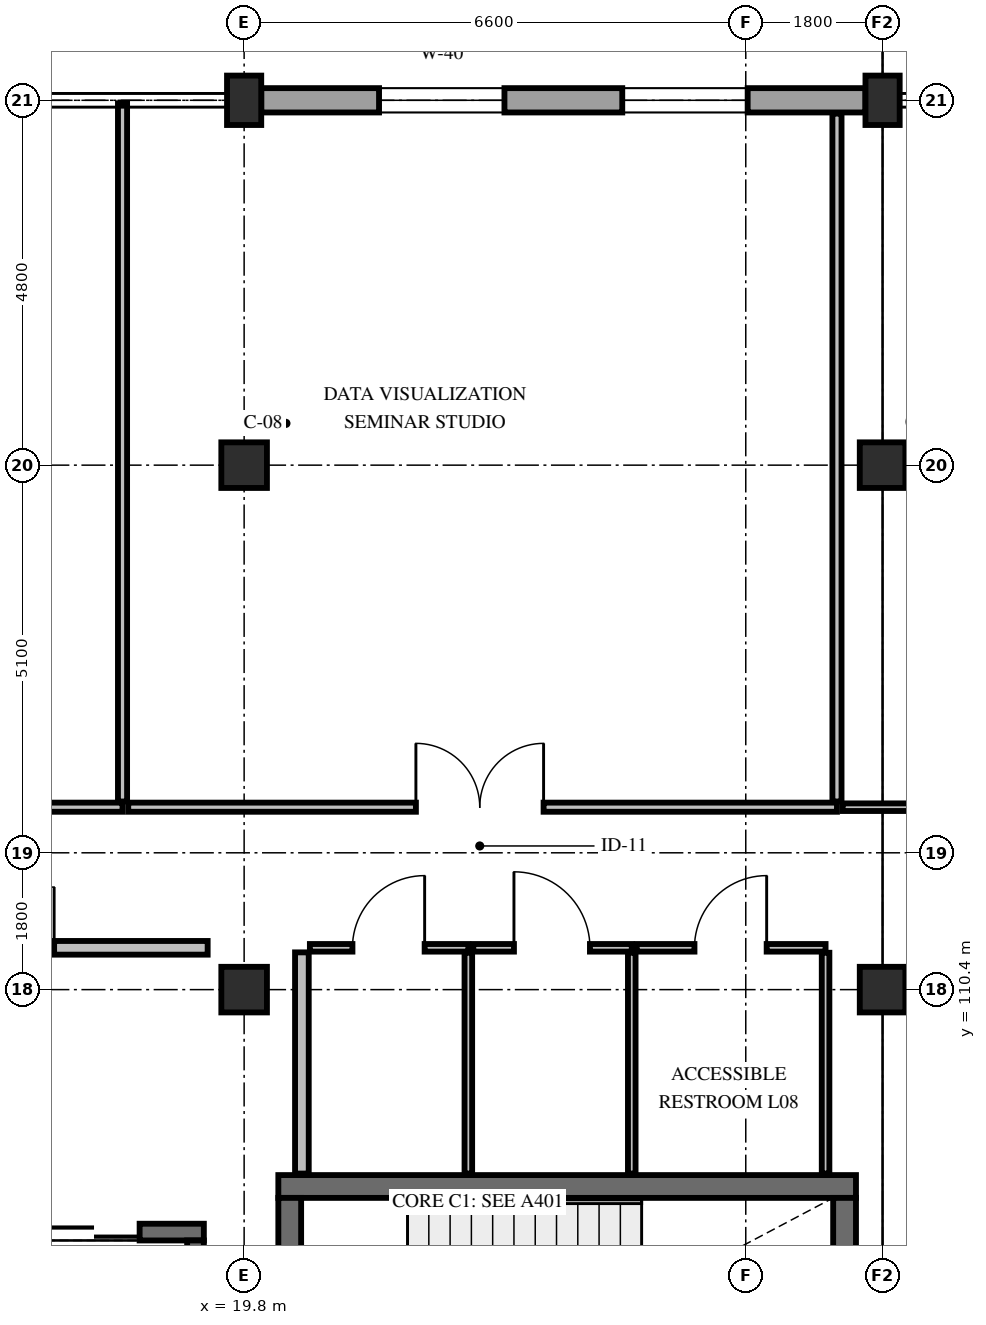
"""IFC4 building model, lengths in metres.
Left out: names, types, materials, properties, quantities, classifications, styles, units other than length and angle.
Written with IfcOpenShell. Run it as: python <this file> out.ifc"""

import sys

from ifc_helpers import new_model, si_unit, direction, frame, frame_2d, origin, origin_2d, place, context, subcontext, project, spatial, rectangle, extrude, element, fill, save


model = new_model("IFC4")
c1 = context("Model", 3, precision=1e-05, world=origin(), true_north=direction((0.0, 1.0)))
c2 = subcontext(c1, "Body", "Model", "MODEL_VIEW")
j1 = project(units=[si_unit("LENGTHUNIT", "METRE"), si_unit("PLANEANGLEUNIT", "RADIAN")], contexts=[c1])
p1 = place(None, origin())
s1 = spatial("IfcSite", under=j1, at=p1, CompositionType="ELEMENT")
p2 = place(p1, origin())
s2 = spatial("IfcBuilding", under=s1, at=p2, CompositionType="ELEMENT")
p3 = place(p2, frame((0.0, 0.0, 38.4)))
s3 = spatial("IfcBuildingStorey", under=s2, at=p3, CompositionType="ELEMENT", Elevation=38.4)
for number, where, z_axis, x_axis in (
    (1, (19.8, 110.4, 0.0), (0.0, 0.0, 1.0), (1.0, 0.0, 0.0)),
    (2, (19.8, 117.3, 0.0), (0.0, 0.0, 1.0), (1.0, 0.0, 0.0)),
):
    element("IfcColumn", number, at=place(p3, frame(where, z_axis=z_axis, x_axis=x_axis)), inside=s3, PredefinedType="COLUMN", context=c2, shape_type="SweptSolid", body=[
        extrude(rectangle(XDim=0.6, YDim=0.6, at=origin_2d()), origin(), (0.0, 0.0, 1.0), 4.2),
    ])
p4 = place(p3, frame((19.8, 122.1, 0.0), z_axis=(0.0, 0.0, 1.0), x_axis=(1.0, 0.0, 0.0)))
e3 = element("IfcColumn", 3, at=p4, inside=s3, PredefinedType="PILASTER", context=c2, shape_type="SweptSolid", body=[
    extrude(rectangle(XDim=0.45, YDim=0.65, at=origin_2d()), origin(), (0.0, 0.0, 1.0), 4.2),
])
for number, where, z_axis, x_axis in (
    (4, (28.2, 110.4, 0.0), (0.0, 0.0, 1.0), (1.0, 0.0, 0.0)),
    (5, (28.2, 117.3, 0.0), (0.0, 0.0, 1.0), (1.0, 0.0, 0.0)),
):
    element("IfcColumn", number, at=place(p3, frame(where, z_axis=z_axis, x_axis=x_axis)), inside=s3, PredefinedType="COLUMN", context=c2, shape_type="SweptSolid", body=[
        extrude(rectangle(XDim=0.6, YDim=0.6, at=origin_2d()), origin(), (0.0, 0.0, 1.0), 4.2),
    ])
p5 = place(p3, frame((28.2, 122.1, 0.0), z_axis=(0.0, 0.0, 1.0), x_axis=(1.0, 0.0, 0.0)))
e6 = element("IfcColumn", 6, at=p5, inside=s3, PredefinedType="PILASTER", context=c2, shape_type="SweptSolid", body=[
    extrude(rectangle(XDim=0.45, YDim=0.65, at=origin_2d()), origin(), (0.0, 0.0, 1.0), 4.2),
])
p6 = place(p3, frame((20.025, 122.1, 0.0), z_axis=(0.0, 0.0, 1.0), x_axis=(1.0, 0.0, 0.0)))
e7 = element("IfcWall", 7, at=p6, inside=s3, PredefinedType="STANDARD", context=c2, shape_type="SweptSolid", body=[
    extrude(rectangle(XDim=7.95, YDim=0.32, at=frame_2d((3.975, 0.0))), origin(), (0.0, 0.0, 1.0), 3.33),
])
p7 = place(p6, frame((1.55, 0.0, 0.85)))
e8 = element("IfcOpeningElement", 8, at=p7, cuts=e7, PredefinedType="OPENING", context=c2, shape_type="SweptSolid", body=[
    extrude(rectangle(XDim=1.65, YDim=2.08, at=frame_2d((0.825, 1.04))), frame((0.0, 0.175, 0.0), z_axis=(0.0, -1.0, 0.0), x_axis=(1.0, 0.0, 0.0)), (0.0, 0.0, 1.0), 0.35),
])
p8 = place(p6, frame((4.75, 0.0, 0.85)))
e9 = element("IfcOpeningElement", 9, at=p8, cuts=e7, PredefinedType="OPENING", context=c2, shape_type="SweptSolid", body=[
    extrude(rectangle(XDim=1.65, YDim=2.08, at=frame_2d((0.825, 1.04))), frame((0.0, 0.175, 0.0), z_axis=(0.0, -1.0, 0.0), x_axis=(1.0, 0.0, 0.0)), (0.0, 0.0, 1.0), 0.35),
])
p9 = place(p3, frame((20.25, 107.81, 0.0), z_axis=(0.0, 0.0, 1.0), x_axis=(1.0, 0.0, 0.0)))
e10 = element("IfcWall", 10, at=p9, inside=s3, PredefinedType="SHEAR", context=c2, shape_type="SweptSolid", body=[
    extrude(rectangle(XDim=7.6, YDim=0.3, at=frame_2d((3.8, 0.0))), origin(), (0.0, 0.0, 1.0), 3.9),
])
p10 = place(p3, frame((20.4, 104.7, 0.0), z_axis=(0.0, 0.0, 1.0), x_axis=(0.0, 1.0, 0.0)))
e11 = element("IfcWall", 11, at=p10, inside=s3, PredefinedType="SHEAR", context=c2, shape_type="SweptSolid", body=[
    extrude(rectangle(XDim=2.96, YDim=0.3, at=frame_2d((1.48, 0.0))), origin(), (0.0, 0.0, 1.0), 3.9),
])
p11 = place(p10, frame((0.92, 0.0, 0.0)))
e12 = element("IfcOpeningElement", 12, at=p11, cuts=e11, PredefinedType="OPENING", context=c2, shape_type="SweptSolid", body=[
    extrude(rectangle(XDim=1.12, YDim=2.2, at=frame_2d((0.56, 1.1))), frame((0.0, 0.165, 0.0), z_axis=(0.0, -1.0, 0.0), x_axis=(1.0, 0.0, 0.0)), (0.0, 0.0, 1.0), 0.33),
])
p12 = place(p3, frame((27.7, 104.7, 0.0), z_axis=(0.0, 0.0, 1.0), x_axis=(0.0, 1.0, 0.0)))
e13 = element("IfcWall", 13, at=p12, inside=s3, PredefinedType="SHEAR", context=c2, shape_type="SweptSolid", body=[
    extrude(rectangle(XDim=2.96, YDim=0.3, at=frame_2d((1.48, 0.0))), origin(), (0.0, 0.0, 1.0), 3.9),
])
p13 = place(p3, frame((16.38, 107.21, 0.0), z_axis=(0.0, 0.0, 1.0), x_axis=(1.0, 0.0, 0.0)))
e14 = element("IfcWall", 14, at=p13, inside=s3, PredefinedType="SHEAR", context=c2, shape_type="SweptSolid", body=[
    extrude(rectangle(XDim=2.89, YDim=0.22, at=frame_2d((1.445, 0.0))), origin(), (0.0, 0.0, 1.0), 3.9),
])
p14 = place(p13, frame((0.845, 0.0, 0.0)))
e15 = element("IfcOpeningElement", 15, at=p14, cuts=e14, PredefinedType="OPENING", context=c2, shape_type="SweptSolid", body=[
    extrude(rectangle(XDim=1.2, YDim=2.2, at=frame_2d((0.6, 1.1))), frame((0.0, 0.125, 0.0), z_axis=(0.0, -1.0, 0.0), x_axis=(1.0, 0.0, 0.0)), (0.0, 0.0, 1.0), 0.25),
])
p15 = place(p3, frame((19.16, 104.7, 0.0), z_axis=(0.0, 0.0, 1.0), x_axis=(0.0, 1.0, 0.0)))
e16 = element("IfcWall", 16, at=p15, inside=s3, PredefinedType="SHEAR", context=c2, shape_type="SweptSolid", body=[
    extrude(rectangle(XDim=2.4, YDim=0.22, at=frame_2d((1.2, 0.0))), origin(), (0.0, 0.0, 1.0), 3.9),
])
p16 = place(p3, frame((13.85, 110.95, 0.0), z_axis=(0.0, 0.0, 1.0), x_axis=(1.0, 0.0, 0.0)))
e17 = element("IfcWall", 17, at=p16, inside=s3, PredefinedType="PARTITIONING", context=c2, shape_type="SweptSolid", body=[
    extrude(rectangle(XDim=5.47, YDim=0.18, at=frame_2d((2.735, 0.0))), origin(), (0.0, 0.0, 1.0), 3.745),
])
p17 = place(p16, frame((1.85, 0.0, 0.0)))
e18 = element("IfcOpeningElement", 18, at=p17, cuts=e17, PredefinedType="OPENING", context=c2, shape_type="SweptSolid", body=[
    extrude(rectangle(XDim=1.6, YDim=2.25, at=frame_2d((0.8, 1.125))), frame((0.0, 0.105, 0.0), z_axis=(0.0, -1.0, 0.0), x_axis=(1.0, 0.0, 0.0)), (0.0, 0.0, 1.0), 0.21),
])
p18 = place(p3, frame((20.56, 107.98, 0.0), z_axis=(0.0, 0.0, 1.0), x_axis=(0.0, 1.0, 0.0)))
e19 = element("IfcWall", 19, at=p18, inside=s3, PredefinedType="PARTITIONING", context=c2, shape_type="SweptSolid", body=[
    extrude(rectangle(XDim=2.91, YDim=0.18, at=frame_2d((1.455, 0.0))), origin(), (0.0, 0.0, 1.0), 3.23),
])
p19 = place(p3, frame((20.665, 110.95, 0.0), z_axis=(0.0, 0.0, 1.0), x_axis=(1.0, 0.0, 0.0)))
e20 = element("IfcWall", 20, at=p19, inside=s3, PredefinedType="PARTITIONING", context=c2, shape_type="SweptSolid", body=[
    extrude(rectangle(XDim=2.085, YDim=0.1, at=frame_2d((1.042, 0.0))), origin(), (0.0, 0.0, 1.0), 3.745),
])
p20 = place(p19, frame((0.56, 0.0, 0.0)))
e21 = element("IfcOpeningElement", 21, at=p20, cuts=e20, PredefinedType="OPENING", context=c2, shape_type="SweptSolid", body=[
    extrude(rectangle(XDim=0.95, YDim=2.15, at=frame_2d((0.475, 1.075))), frame((0.0, 0.065, 0.0), z_axis=(0.0, -1.0, 0.0), x_axis=(1.0, 0.0, 0.0)), (0.0, 0.0, 1.0), 0.13),
])
p21 = place(p3, frame((22.75, 107.98, 0.0), z_axis=(0.0, 0.0, 1.0), x_axis=(0.0, 1.0, 0.0)))
e22 = element("IfcWall", 22, at=p21, inside=s3, PredefinedType="PARTITIONING", context=c2, shape_type="SweptSolid", body=[
    extrude(rectangle(XDim=2.905, YDim=0.1, at=frame_2d((1.453, 0.0))), origin(), (0.0, 0.0, 1.0), 3.23),
])
p22 = place(p3, frame((22.815, 110.95, 0.0), z_axis=(0.0, 0.0, 1.0), x_axis=(1.0, 0.0, 0.0)))
e23 = element("IfcWall", 23, at=p22, inside=s3, PredefinedType="PARTITIONING", context=c2, shape_type="SweptSolid", body=[
    extrude(rectangle(XDim=2.085, YDim=0.1, at=frame_2d((1.042, 0.0))), origin(), (0.0, 0.0, 1.0), 3.88),
])
p23 = place(p22, frame((0.535, 0.0, 0.0)))
e24 = element("IfcOpeningElement", 24, at=p23, cuts=e23, PredefinedType="OPENING", context=c2, shape_type="SweptSolid", body=[
    extrude(rectangle(XDim=1.0, YDim=2.15, at=frame_2d((0.5, 1.075))), frame((0.0, 0.065, 0.0), z_axis=(0.0, -1.0, 0.0), x_axis=(1.0, 0.0, 0.0)), (0.0, 0.0, 1.0), 0.13),
])
p24 = place(p3, frame((24.9, 107.98, 0.0), z_axis=(0.0, 0.0, 1.0), x_axis=(0.0, 1.0, 0.0)))
e25 = element("IfcWall", 25, at=p24, inside=s3, PredefinedType="PARTITIONING", context=c2, shape_type="SweptSolid", body=[
    extrude(rectangle(XDim=2.905, YDim=0.1, at=frame_2d((1.453, 0.0))), origin(), (0.0, 0.0, 1.0), 3.23),
])
p25 = place(p3, frame((24.965, 110.95, 0.0), z_axis=(0.0, 0.0, 1.0), x_axis=(1.0, 0.0, 0.0)))
e26 = element("IfcWall", 26, at=p25, inside=s3, PredefinedType="PARTITIONING", context=c2, shape_type="SweptSolid", body=[
    extrude(rectangle(XDim=2.485, YDim=0.1, at=frame_2d((1.242, 0.0))), origin(), (0.0, 0.0, 1.0), 3.745),
])
p26 = place(p25, frame((0.76, 0.0, 0.0)))
e27 = element("IfcOpeningElement", 27, at=p26, cuts=e26, PredefinedType="OPENING", context=c2, shape_type="SweptSolid", body=[
    extrude(rectangle(XDim=0.95, YDim=2.15, at=frame_2d((0.475, 1.075))), frame((0.0, 0.065, 0.0), z_axis=(0.0, -1.0, 0.0), x_axis=(1.0, 0.0, 0.0)), (0.0, 0.0, 1.0), 0.13),
])
p27 = place(p3, frame((27.45, 107.98, 0.0), z_axis=(0.0, 0.0, 1.0), x_axis=(0.0, 1.0, 0.0)))
e28 = element("IfcWall", 28, at=p27, inside=s3, PredefinedType="PARTITIONING", context=c2, shape_type="SweptSolid", body=[
    extrude(rectangle(XDim=2.905, YDim=0.1, at=frame_2d((1.453, 0.0))), origin(), (0.0, 0.0, 1.0), 3.23),
])
p28 = place(p3, frame((9.275, 112.8, 0.0), z_axis=(0.0, 0.0, 1.0), x_axis=(1.0, 0.0, 0.0)))
e29 = element("IfcWall", 29, at=p28, inside=s3, PredefinedType="PARTITIONING", context=c2, shape_type="SweptSolid", body=[
    extrude(rectangle(XDim=8.925, YDim=0.12, at=frame_2d((4.462, 0.0))), origin(), (0.0, 0.0, 1.0), 3.53),
])
p29 = place(p28, frame((4.785, 0.0, 0.0)))
e30 = element("IfcOpeningElement", 30, at=p29, cuts=e29, PredefinedType="OPENING", context=c2, shape_type="SweptSolid", body=[
    extrude(rectangle(XDim=1.38, YDim=2.25, at=frame_2d((0.69, 1.125))), frame((0.0, 0.075, 0.0), z_axis=(0.0, -1.0, 0.0), x_axis=(1.0, 0.0, 0.0)), (0.0, 0.0, 1.0), 0.15),
])
p30 = place(p3, frame((18.2, 112.875, 0.0), z_axis=(0.0, 0.0, 1.0), x_axis=(0.0, 1.0, 0.0)))
e31 = element("IfcWall", 31, at=p30, inside=s3, PredefinedType="PARTITIONING", context=c2, shape_type="SweptSolid", body=[
    extrude(rectangle(XDim=9.185, YDim=0.12, at=frame_2d((4.593, 0.0))), origin(), (0.0, 0.0, 1.0), 3.33),
])
p31 = place(p3, frame((18.275, 112.8, 0.0), z_axis=(0.0, 0.0, 1.0), x_axis=(1.0, 0.0, 0.0)))
e32 = element("IfcWall", 32, at=p31, inside=s3, PredefinedType="PARTITIONING", context=c2, shape_type="SweptSolid", body=[
    extrude(rectangle(XDim=9.325, YDim=0.12, at=frame_2d((4.663, 0.0))), origin(), (0.0, 0.0, 1.0), 3.53),
])
p32 = place(p31, frame((3.785, 0.0, 0.0)))
e33 = element("IfcOpeningElement", 33, at=p32, cuts=e32, PredefinedType="OPENING", context=c2, shape_type="SweptSolid", body=[
    extrude(rectangle(XDim=1.68, YDim=2.3, at=frame_2d((0.84, 1.15))), frame((0.0, 0.075, 0.0), z_axis=(0.0, -1.0, 0.0), x_axis=(1.0, 0.0, 0.0)), (0.0, 0.0, 1.0), 0.15),
])
p33 = place(p3, frame((27.6, 112.875, 0.0), z_axis=(0.0, 0.0, 1.0), x_axis=(0.0, 1.0, 0.0)))
e34 = element("IfcWall", 34, at=p33, inside=s3, PredefinedType="PARTITIONING", context=c2, shape_type="SweptSolid", body=[
    extrude(rectangle(XDim=9.05, YDim=0.12, at=frame_2d((4.525, 0.0))), origin(), (0.0, 0.0, 1.0), 3.23),
])
p34 = place(p3, frame((27.675, 112.8, 0.0), z_axis=(0.0, 0.0, 1.0), x_axis=(1.0, 0.0, 0.0)))
e35 = element("IfcWall", 35, at=p34, inside=s3, PredefinedType="PARTITIONING", context=c2, shape_type="SweptSolid", body=[
    extrude(rectangle(XDim=9.525, YDim=0.1, at=frame_2d((4.762, 0.0))), origin(), (0.0, 0.0, 1.0), 3.53),
])
p35 = place(p34, frame((6.365, 0.0, 0.0)))
e36 = element("IfcOpeningElement", 36, at=p35, cuts=e35, PredefinedType="OPENING", context=c2, shape_type="SweptSolid", body=[
    extrude(rectangle(XDim=1.02, YDim=2.2, at=frame_2d((0.51, 1.1))), frame((0.0, 0.065, 0.0), z_axis=(0.0, -1.0, 0.0), x_axis=(1.0, 0.0, 0.0)), (0.0, 0.0, 1.0), 0.13),
])
p36 = place(p7, origin())
e37 = element("IfcWindow", 37, at=p36, inside=s3, PartitioningType="SINGLE_PANEL", PredefinedType="WINDOW", context=c2, shape_type="SweptSolid", body=[
    extrude(rectangle(XDim=1.65, YDim=2.08, at=frame_2d((0.825, 1.04))), frame((0.0, 0.03, 0.0), z_axis=(0.0, -1.0, 0.0), x_axis=(1.0, 0.0, 0.0)), (0.0, 0.0, 1.0), 0.06),
])
fill(e8, e37)
p37 = place(p8, origin())
e38 = element("IfcWindow", 38, at=p37, inside=s3, PartitioningType="SINGLE_PANEL", PredefinedType="WINDOW", context=c2, shape_type="SweptSolid", body=[
    extrude(rectangle(XDim=1.65, YDim=2.08, at=frame_2d((0.825, 1.04))), frame((0.0, 0.03, 0.0), z_axis=(0.0, -1.0, 0.0), x_axis=(1.0, 0.0, 0.0)), (0.0, 0.0, 1.0), 0.06),
])
fill(e9, e38)
p38 = place(p14, origin())
e39 = element("IfcDoor", 39, at=p38, inside=s3, OperationType="DOUBLE_DOOR_SLIDING", PredefinedType="DOOR", context=c2, shape_type="SweptSolid", body=[
    extrude(rectangle(XDim=1.2, YDim=2.2, at=frame_2d((0.6, 1.1))), frame((0.0, 0.025, 0.0), z_axis=(0.0, -1.0, 0.0), x_axis=(1.0, 0.0, 0.0)), (0.0, 0.0, 1.0), 0.05),
])
fill(e15, e39)
p39 = place(p17, origin())
e40 = element("IfcDoor", 40, at=p39, inside=s3, OperationType="DOUBLE_DOOR_SINGLE_SWING", PredefinedType="DOOR", context=c2, shape_type="SweptSolid", body=[
    extrude(rectangle(XDim=1.6, YDim=2.25, at=frame_2d((0.8, 1.125))), frame((0.0, 0.025, 0.0), z_axis=(0.0, -1.0, 0.0), x_axis=(1.0, 0.0, 0.0)), (0.0, 0.0, 1.0), 0.05),
])
fill(e18, e40)
p40 = place(p20, origin())
e41 = element("IfcDoor", 41, at=p40, inside=s3, OperationType="SINGLE_SWING_RIGHT", PredefinedType="DOOR", context=c2, shape_type="SweptSolid", body=[
    extrude(rectangle(XDim=0.95, YDim=2.15, at=frame_2d((0.475, 1.075))), frame((0.0, 0.025, 0.0), z_axis=(0.0, -1.0, 0.0), x_axis=(1.0, 0.0, 0.0)), (0.0, 0.0, 1.0), 0.05),
])
fill(e21, e41)
p41 = place(p23, origin())
e42 = element("IfcDoor", 42, at=p41, inside=s3, OperationType="SINGLE_SWING_LEFT", PredefinedType="DOOR", context=c2, shape_type="SweptSolid", body=[
    extrude(rectangle(XDim=1.0, YDim=2.15, at=frame_2d((0.5, 1.075))), frame((0.0, 0.025, 0.0), z_axis=(0.0, -1.0, 0.0), x_axis=(1.0, 0.0, 0.0)), (0.0, 0.0, 1.0), 0.05),
])
fill(e24, e42)
p42 = place(p26, origin())
e43 = element("IfcDoor", 43, at=p42, inside=s3, OperationType="SINGLE_SWING_RIGHT", PredefinedType="DOOR", context=c2, shape_type="SweptSolid", body=[
    extrude(rectangle(XDim=0.95, YDim=2.15, at=frame_2d((0.475, 1.075))), frame((0.0, 0.025, 0.0), z_axis=(0.0, -1.0, 0.0), x_axis=(1.0, 0.0, 0.0)), (0.0, 0.0, 1.0), 0.05),
])
fill(e27, e43)
p43 = place(p32, origin())
e44 = element("IfcDoor", 44, at=p43, inside=s3, OperationType="DOUBLE_DOOR_SINGLE_SWING", PredefinedType="DOOR", context=c2, shape_type="SweptSolid", body=[
    extrude(rectangle(XDim=1.68, YDim=2.3, at=frame_2d((0.84, 1.15))), frame((0.0, 0.025, 0.0), z_axis=(0.0, -1.0, 0.0), x_axis=(1.0, 0.0, 0.0)), (0.0, 0.0, 1.0), 0.05),
])
fill(e33, e44)
save(model, sys.argv[1])
